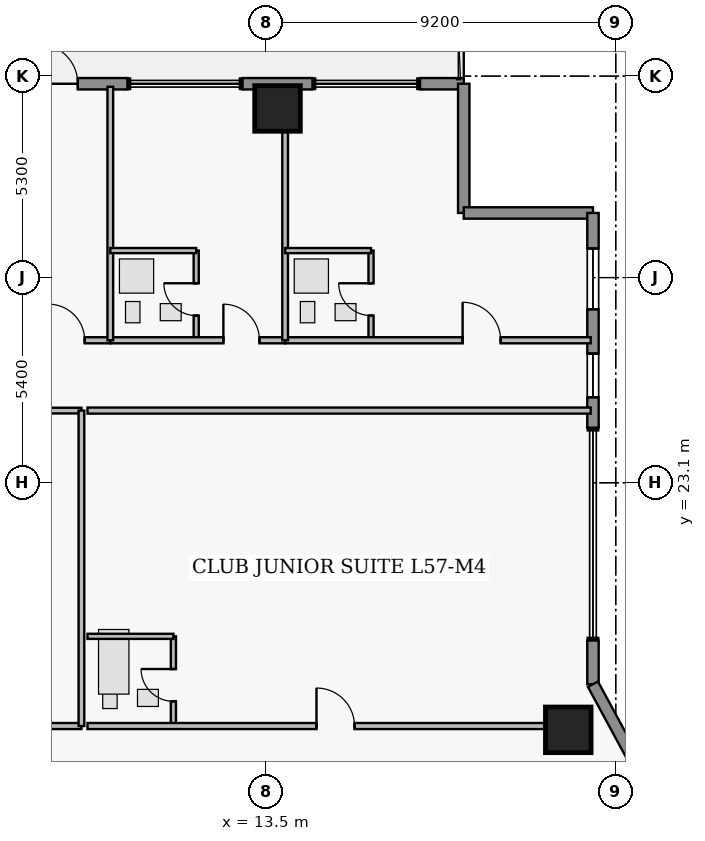
"""IFC4 building model, lengths in metres.
Left out: names, types, materials, properties, quantities, classifications, styles, units other than length and angle.
Written with IfcOpenShell. Run it as: python <this file> out.ifc"""

import sys

from ifc_helpers import new_model, si_unit, direction, frame, frame_2d, origin, origin_2d, place, context, subcontext, project, spatial, rectangle, extrude, element, fill, save


model = new_model("IFC4")
c1 = context("Model", 3, precision=1e-05, world=origin(), true_north=direction((0.0, 1.0)))
c2 = subcontext(c1, "Body", "Model", "MODEL_VIEW")
j1 = project(units=[si_unit("LENGTHUNIT", "METRE"), si_unit("PLANEANGLEUNIT", "RADIAN")], contexts=[c1])
p1 = place(None, origin())
s1 = spatial("IfcSite", under=j1, at=p1, CompositionType="ELEMENT")
p2 = place(p1, origin())
s2 = spatial("IfcBuilding", under=s1, at=p2, CompositionType="ELEMENT")
p3 = place(p2, frame((0.0, 0.0, 226.15)))
s3 = spatial("IfcBuildingStorey", under=s2, at=p3, CompositionType="ELEMENT", Elevation=226.15)
for number, where, z_axis, x_axis in (
    (1, (13.8, 32.95, 0.0), (0.0, 0.0, 1.0), (1.0, 0.0, 0.0)),
    (2, (21.45, 16.6, 0.0), (0.0, 0.0, 1.0), (1.0, 0.0, 0.0)),
):
    element("IfcColumn", number, at=place(p3, frame(where, z_axis=z_axis, x_axis=x_axis)), inside=s3, PredefinedType="COLUMN", context=c2, shape_type="SweptSolid", body=[
        extrude(rectangle(XDim=1.2, YDim=1.2, at=origin_2d()), origin(), (0.0, 0.0, 1.0), 3.75),
    ])
p4 = place(p3, frame((3.68, 33.6, 0.0), z_axis=(0.0, 0.0, 1.0), x_axis=(1.0, 0.0, 0.0)))
e3 = element("IfcWall", 3, at=p4, inside=s3, PredefinedType="STANDARD", context=c2, shape_type="SweptSolid", body=[
    extrude(rectangle(XDim=6.17, YDim=0.3, at=frame_2d((3.085, 0.0))), origin(), (0.0, 0.0, 1.0), 3.53),
])
p5 = place(p4, frame((3.815, 0.0, 0.0)))
e4 = element("IfcOpeningElement", 4, at=p5, cuts=e3, PredefinedType="OPENING", context=c2, shape_type="SweptSolid", body=[
    extrude(rectangle(XDim=1.05, YDim=2.2, at=frame_2d((0.525, 1.1))), frame((0.0, 0.16, 0.0), z_axis=(0.0, -1.0, 0.0), x_axis=(1.0, 0.0, 0.0)), (0.0, 0.0, 1.0), 0.32),
])
p6 = place(p4, frame((2.018, 0.0, 0.95)))
e5 = element("IfcOpeningElement", 5, at=p6, cuts=e3, PredefinedType="OPENING", context=c2, shape_type="SweptSolid", body=[
    extrude(rectangle(XDim=1.15, YDim=1.55, at=frame_2d((0.575, 0.775))), frame((0.0, 0.16, 0.0), z_axis=(0.0, -1.0, 0.0), x_axis=(1.0, 0.0, 0.0)), (0.0, 0.0, 1.0), 0.32),
])
p7 = place(p3, frame((12.88, 33.6, 0.0), z_axis=(0.0, 0.0, 1.0), x_axis=(1.0, 0.0, 0.0)))
e6 = element("IfcWall", 6, at=p7, inside=s3, PredefinedType="STANDARD", context=c2, shape_type="SweptSolid", body=[
    extrude(rectangle(XDim=1.84, YDim=0.3, at=frame_2d((0.92, 0.0))), origin(), (0.0, 0.0, 1.0), 3.53),
])
p8 = place(p3, frame((17.55, 33.6, 0.0), z_axis=(0.0, 0.0, 1.0), x_axis=(1.0, 0.0, 0.0)))
e7 = element("IfcWall", 7, at=p8, inside=s3, PredefinedType="STANDARD", context=c2, shape_type="SweptSolid", body=[
    extrude(rectangle(XDim=1.15, YDim=0.3, at=frame_2d((0.575, 0.0))), origin(), (0.0, 0.0, 1.0), 3.53),
])
for number, where, z_axis, x_axis in (
    (8, (18.7, 33.6, 0.0), (0.0, 0.0, 1.0), (0.0, -1.0, 0.0)),
    (9, (18.7, 30.2, 0.0), (0.0, 0.0, 1.0), (1.0, 0.0, 0.0)),
):
    element("IfcWall", number, at=place(p3, frame(where, z_axis=z_axis, x_axis=x_axis)), inside=s3, PredefinedType="STANDARD", context=c2, shape_type="SweptSolid", body=[
        extrude(rectangle(XDim=3.4, YDim=0.3, at=frame_2d((1.7, 0.0))), origin(), (0.0, 0.0, 1.0), 3.53),
    ])
p9 = place(p3, frame((22.1, 30.2, 0.0), z_axis=(0.0, 0.0, 1.0), x_axis=(0.0, -1.0, 0.0)))
e10 = element("IfcWall", 10, at=p9, inside=s3, PredefinedType="STANDARD", context=c2, shape_type="SweptSolid", body=[
    extrude(rectangle(XDim=5.65, YDim=0.3, at=frame_2d((2.825, 0.0))), origin(), (0.0, 0.0, 1.0), 3.53),
])
p10 = place(p9, frame((0.935, 0.0, 0.85)))
e11 = element("IfcOpeningElement", 11, at=p10, cuts=e10, PredefinedType="OPENING", context=c2, shape_type="SweptSolid", body=[
    extrude(rectangle(XDim=1.6, YDim=1.8, at=frame_2d((0.8, 0.9))), frame((0.0, 0.16, 0.0), z_axis=(0.0, -1.0, 0.0), x_axis=(1.0, 0.0, 0.0)), (0.0, 0.0, 1.0), 0.32),
])
p11 = place(p9, frame((3.7, 0.0, 0.95)))
e12 = element("IfcOpeningElement", 12, at=p11, cuts=e10, PredefinedType="OPENING", context=c2, shape_type="SweptSolid", body=[
    extrude(rectangle(XDim=1.15, YDim=1.55, at=frame_2d((0.575, 0.775))), frame((0.0, 0.16, 0.0), z_axis=(0.0, -1.0, 0.0), x_axis=(1.0, 0.0, 0.0)), (0.0, 0.0, 1.0), 0.32),
])
p12 = place(p3, frame((22.1, 18.95, 0.0), z_axis=(0.0, 0.0, 1.0), x_axis=(0.0, -1.0, 0.0)))
e13 = element("IfcWall", 13, at=p12, inside=s3, PredefinedType="STANDARD", context=c2, shape_type="SweptSolid", body=[
    extrude(rectangle(XDim=1.15, YDim=0.3, at=frame_2d((0.575, 0.0))), origin(), (0.0, 0.0, 1.0), 3.53),
])
p13 = place(p3, frame((22.1, 17.8, 0.0), z_axis=(0.0, 0.0, 1.0), x_axis=(0.476258655584, -0.879305233114, 0.0)))
e14 = element("IfcWall", 14, at=p13, inside=s3, PredefinedType="STANDARD", context=c2, shape_type="SweptSolid", body=[
    extrude(rectangle(XDim=5.459, YDim=0.3, at=frame_2d((2.729, 0.0))), origin(), (0.0, 0.0, 1.0), 3.53),
])
p14 = place(p3, frame((4.8, 26.85, 0.0), z_axis=(0.0, 0.0, 1.0), x_axis=(1.0, 0.0, 0.0)))
e15 = element("IfcWall", 15, at=p14, inside=s3, PredefinedType="PARTITIONING", context=c2, shape_type="SweptSolid", body=[
    extrude(rectangle(XDim=4.6, YDim=0.16, at=frame_2d((2.3, 0.0))), origin(), (0.0, 0.0, 1.0), 3.53),
])
p15 = place(p14, frame((2.975, 0.0, 0.0)))
e16 = element("IfcOpeningElement", 16, at=p15, cuts=e15, PredefinedType="OPENING", context=c2, shape_type="SweptSolid", body=[
    extrude(rectangle(XDim=0.95, YDim=2.15, at=frame_2d((0.475, 1.075))), frame((0.0, 0.09, 0.0), z_axis=(0.0, -1.0, 0.0), x_axis=(1.0, 0.0, 0.0)), (0.0, 0.0, 1.0), 0.18),
])
p16 = place(p3, frame((11.66, 26.85, 0.0), z_axis=(0.0, 0.0, 1.0), x_axis=(0.0, 1.0, 0.0)))
e17 = element("IfcWall", 17, at=p16, inside=s3, PredefinedType="PLUMBINGWALL", context=c2, shape_type="SweptSolid", body=[
    extrude(rectangle(XDim=2.36, YDim=0.135, at=frame_2d((1.18, 0.0))), origin(), (0.0, 0.0, 1.0), 3.53),
])
p17 = place(p16, frame((0.65, 0.0, 0.0)))
e18 = element("IfcOpeningElement", 18, at=p17, cuts=e17, PredefinedType="OPENING", context=c2, shape_type="SweptSolid", body=[
    extrude(rectangle(XDim=0.85, YDim=2.1, at=frame_2d((0.425, 1.05))), frame((0.0, 0.077, 0.0), z_axis=(0.0, -1.0, 0.0), x_axis=(1.0, 0.0, 0.0)), (0.0, 0.0, 1.0), 0.155),
])
p18 = place(p3, frame((9.4, 26.85, 0.0), z_axis=(0.0, 0.0, 1.0), x_axis=(1.0, 0.0, 0.0)))
e19 = element("IfcWall", 19, at=p18, inside=s3, PredefinedType="PARTITIONING", context=c2, shape_type="SweptSolid", body=[
    extrude(rectangle(XDim=4.6, YDim=0.16, at=frame_2d((2.3, 0.0))), origin(), (0.0, 0.0, 1.0), 3.53),
])
p19 = place(p18, frame((2.975, 0.0, 0.0)))
e20 = element("IfcOpeningElement", 20, at=p19, cuts=e19, PredefinedType="OPENING", context=c2, shape_type="SweptSolid", body=[
    extrude(rectangle(XDim=0.95, YDim=2.15, at=frame_2d((0.475, 1.075))), frame((0.0, 0.09, 0.0), z_axis=(0.0, -1.0, 0.0), x_axis=(1.0, 0.0, 0.0)), (0.0, 0.0, 1.0), 0.18),
])
p20 = place(p3, frame((16.26, 26.85, 0.0), z_axis=(0.0, 0.0, 1.0), x_axis=(0.0, 1.0, 0.0)))
e21 = element("IfcWall", 21, at=p20, inside=s3, PredefinedType="PLUMBINGWALL", context=c2, shape_type="SweptSolid", body=[
    extrude(rectangle(XDim=2.36, YDim=0.135, at=frame_2d((1.18, 0.0))), origin(), (0.0, 0.0, 1.0), 3.53),
])
p21 = place(p20, frame((0.65, 0.0, 0.0)))
e22 = element("IfcOpeningElement", 22, at=p21, cuts=e21, PredefinedType="OPENING", context=c2, shape_type="SweptSolid", body=[
    extrude(rectangle(XDim=0.85, YDim=2.1, at=frame_2d((0.425, 1.05))), frame((0.0, 0.077, 0.0), z_axis=(0.0, -1.0, 0.0), x_axis=(1.0, 0.0, 0.0)), (0.0, 0.0, 1.0), 0.155),
])
p22 = place(p3, frame((14.0, 26.85, 0.0), z_axis=(0.0, 0.0, 1.0), x_axis=(1.0, 0.0, 0.0)))
e23 = element("IfcWall", 23, at=p22, inside=s3, PredefinedType="PARTITIONING", context=c2, shape_type="SweptSolid", body=[
    extrude(rectangle(XDim=8.04, YDim=0.16, at=frame_2d((4.02, 0.0))), origin(), (0.0, 0.0, 1.0), 3.53),
])
p23 = place(p22, frame((4.67, 0.0, 0.0)))
e24 = element("IfcOpeningElement", 24, at=p23, cuts=e23, PredefinedType="OPENING", context=c2, shape_type="SweptSolid", body=[
    extrude(rectangle(XDim=1.0, YDim=2.15, at=frame_2d((0.5, 1.075))), frame((0.0, 0.09, 0.0), z_axis=(0.0, -1.0, 0.0), x_axis=(1.0, 0.0, 0.0)), (0.0, 0.0, 1.0), 0.18),
])
p24 = place(p3, frame((0.98, 16.7, 0.0), z_axis=(0.0, 0.0, 1.0), x_axis=(1.0, 0.0, 0.0)))
e25 = element("IfcWall", 25, at=p24, inside=s3, PredefinedType="PARTITIONING", context=c2, shape_type="SweptSolid", body=[
    extrude(rectangle(XDim=7.66, YDim=0.16, at=frame_2d((3.83, 0.0))), origin(), (0.0, 0.0, 1.0), 3.124),
])
p25 = place(p24, frame((5.43, 0.0, 0.0)))
e26 = element("IfcOpeningElement", 26, at=p25, cuts=e25, PredefinedType="OPENING", context=c2, shape_type="SweptSolid", body=[
    extrude(rectangle(XDim=1.08, YDim=2.18, at=frame_2d((0.54, 1.09))), frame((0.0, 0.09, 0.0), z_axis=(0.0, -1.0, 0.0), x_axis=(1.0, 0.0, 0.0)), (0.0, 0.0, 1.0), 0.18),
])
p26 = place(p3, frame((11.06, 16.7, 0.0), z_axis=(0.0, 0.0, 1.0), x_axis=(0.0, 1.0, 0.0)))
e27 = element("IfcWall", 27, at=p26, inside=s3, PredefinedType="PLUMBINGWALL", context=c2, shape_type="SweptSolid", body=[
    extrude(rectangle(XDim=2.36, YDim=0.135, at=frame_2d((1.18, 0.0))), origin(), (0.0, 0.0, 1.0), 3.53),
])
p27 = place(p26, frame((0.65, 0.0, 0.0)))
e28 = element("IfcOpeningElement", 28, at=p27, cuts=e27, PredefinedType="OPENING", context=c2, shape_type="SweptSolid", body=[
    extrude(rectangle(XDim=0.85, YDim=2.1, at=frame_2d((0.425, 1.05))), frame((0.0, 0.077, 0.0), z_axis=(0.0, -1.0, 0.0), x_axis=(1.0, 0.0, 0.0)), (0.0, 0.0, 1.0), 0.155),
])
p28 = place(p3, frame((8.8, 16.7, 0.0), z_axis=(0.0, 0.0, 1.0), x_axis=(1.0, 0.0, 0.0)))
e29 = element("IfcWall", 29, at=p28, inside=s3, PredefinedType="PARTITIONING", context=c2, shape_type="SweptSolid", body=[
    extrude(rectangle(XDim=13.24, YDim=0.16, at=frame_2d((6.62, 0.0))), origin(), (0.0, 0.0, 1.0), 3.124),
])
p29 = place(p28, frame((6.025, 0.0, 0.0)))
e30 = element("IfcOpeningElement", 30, at=p29, cuts=e29, PredefinedType="OPENING", context=c2, shape_type="SweptSolid", body=[
    extrude(rectangle(XDim=1.0, YDim=2.15, at=frame_2d((0.5, 1.075))), frame((0.0, 0.09, 0.0), z_axis=(0.0, -1.0, 0.0), x_axis=(1.0, 0.0, 0.0)), (0.0, 0.0, 1.0), 0.18),
])
p30 = place(p3, frame((9.4, 26.85, 0.0), z_axis=(0.0, 0.0, 1.0), x_axis=(0.0, 1.0, 0.0)))
e31 = element("IfcWall", 31, at=p30, inside=s3, PredefinedType="PARTITIONING", context=c2, shape_type="SweptSolid", body=[
    extrude(rectangle(XDim=6.67, YDim=0.15, at=frame_2d((3.335, 0.0))), origin(), (0.0, 0.0, 1.0), 3.53),
])
p31 = place(p3, frame((9.4, 29.21, 0.0), z_axis=(0.0, 0.0, 1.0), x_axis=(1.0, 0.0, 0.0)))
e32 = element("IfcWall", 32, at=p31, inside=s3, PredefinedType="PLUMBINGWALL", context=c2, shape_type="SweptSolid", body=[
    extrude(rectangle(XDim=2.26, YDim=0.135, at=frame_2d((1.13, 0.0))), origin(), (0.0, 0.0, 1.0), 3.53),
])
p32 = place(p3, frame((14.0, 26.85, 0.0), z_axis=(0.0, 0.0, 1.0), x_axis=(0.0, 1.0, 0.0)))
e33 = element("IfcWall", 33, at=p32, inside=s3, PredefinedType="PARTITIONING", context=c2, shape_type="SweptSolid", body=[
    extrude(rectangle(XDim=6.67, YDim=0.15, at=frame_2d((3.335, 0.0))), origin(), (0.0, 0.0, 1.0), 2.519),
])
p33 = place(p3, frame((14.0, 29.21, 0.0), z_axis=(0.0, 0.0, 1.0), x_axis=(1.0, 0.0, 0.0)))
e34 = element("IfcWall", 34, at=p33, inside=s3, PredefinedType="PLUMBINGWALL", context=c2, shape_type="SweptSolid", body=[
    extrude(rectangle(XDim=2.26, YDim=0.135, at=frame_2d((1.13, 0.0))), origin(), (0.0, 0.0, 1.0), 3.53),
])
p34 = place(p3, frame((0.98, 25.0, 0.0), z_axis=(0.0, 0.0, 1.0), x_axis=(1.0, 0.0, 0.0)))
e35 = element("IfcWall", 35, at=p34, inside=s3, PredefinedType="PARTITIONING", context=c2, shape_type="SweptSolid", body=[
    extrude(rectangle(XDim=7.66, YDim=0.15, at=frame_2d((3.83, 0.0))), origin(), (0.0, 0.0, 1.0), 3.124),
])
p35 = place(p3, frame((8.64, 16.7, 0.0), z_axis=(0.0, 0.0, 1.0), x_axis=(0.0, 1.0, 0.0)))
e36 = element("IfcWall", 36, at=p35, inside=s3, PredefinedType="PARTITIONING", context=c2, shape_type="SweptSolid", body=[
    extrude(rectangle(XDim=8.3, YDim=0.15, at=frame_2d((4.15, 0.0))), origin(), (0.0, 0.0, 1.0), 3.53),
])
p36 = place(p3, frame((8.8, 19.06, 0.0), z_axis=(0.0, 0.0, 1.0), x_axis=(1.0, 0.0, 0.0)))
e37 = element("IfcWall", 37, at=p36, inside=s3, PredefinedType="PLUMBINGWALL", context=c2, shape_type="SweptSolid", body=[
    extrude(rectangle(XDim=2.26, YDim=0.135, at=frame_2d((1.13, 0.0))), origin(), (0.0, 0.0, 1.0), 3.124),
])
p37 = place(p3, frame((8.8, 25.0, 0.0), z_axis=(0.0, 0.0, 1.0), x_axis=(1.0, 0.0, 0.0)))
e38 = element("IfcWall", 38, at=p37, inside=s3, PredefinedType="PARTITIONING", context=c2, shape_type="SweptSolid", body=[
    extrude(rectangle(XDim=13.24, YDim=0.16, at=frame_2d((6.62, 0.0))), origin(), (0.0, 0.0, 1.0), 3.124),
])
p38 = place(p5, origin())
e39 = element("IfcDoor", 39, at=p38, inside=s3, OperationType="SINGLE_SWING_LEFT", PredefinedType="DOOR", context=c2, shape_type="SweptSolid", body=[
    extrude(rectangle(XDim=1.05, YDim=2.2, at=frame_2d((0.525, 1.1))), frame((0.0, 0.025, 0.0), z_axis=(0.0, -1.0, 0.0), x_axis=(1.0, 0.0, 0.0)), (0.0, 0.0, 1.0), 0.05),
])
fill(e4, e39)
p39 = place(p10, origin())
e40 = element("IfcWindow", 40, at=p39, inside=s3, PartitioningType="SINGLE_PANEL", PredefinedType="WINDOW", context=c2, shape_type="SweptSolid", body=[
    extrude(rectangle(XDim=1.6, YDim=1.8, at=frame_2d((0.8, 0.9))), frame((0.0, 0.03, 0.0), z_axis=(0.0, -1.0, 0.0), x_axis=(1.0, 0.0, 0.0)), (0.0, 0.0, 1.0), 0.06),
])
fill(e11, e40)
p40 = place(p11, origin())
e41 = element("IfcWindow", 41, at=p40, inside=s3, PartitioningType="SINGLE_PANEL", PredefinedType="WINDOW", context=c2, shape_type="SweptSolid", body=[
    extrude(rectangle(XDim=1.15, YDim=1.55, at=frame_2d((0.575, 0.775))), frame((0.0, 0.03, 0.0), z_axis=(0.0, -1.0, 0.0), x_axis=(1.0, 0.0, 0.0)), (0.0, 0.0, 1.0), 0.06),
])
fill(e12, e41)
p41 = place(p15, origin())
e42 = element("IfcDoor", 42, at=p41, inside=s3, OperationType="SINGLE_SWING_LEFT", PredefinedType="DOOR", context=c2, shape_type="SweptSolid", body=[
    extrude(rectangle(XDim=0.95, YDim=2.15, at=frame_2d((0.475, 1.075))), frame((0.0, 0.025, 0.0), z_axis=(0.0, -1.0, 0.0), x_axis=(1.0, 0.0, 0.0)), (0.0, 0.0, 1.0), 0.05),
])
fill(e16, e42)
p42 = place(p17, origin())
e43 = element("IfcDoor", 43, at=p42, inside=s3, OperationType="SINGLE_SWING_RIGHT", PredefinedType="DOOR", context=c2, shape_type="SweptSolid", body=[
    extrude(rectangle(XDim=0.85, YDim=2.1, at=frame_2d((0.425, 1.05))), frame((0.0, 0.025, 0.0), z_axis=(0.0, -1.0, 0.0), x_axis=(1.0, 0.0, 0.0)), (0.0, 0.0, 1.0), 0.05),
])
fill(e18, e43)
p43 = place(p19, origin())
e44 = element("IfcDoor", 44, at=p43, inside=s3, OperationType="SINGLE_SWING_LEFT", PredefinedType="DOOR", context=c2, shape_type="SweptSolid", body=[
    extrude(rectangle(XDim=0.95, YDim=2.15, at=frame_2d((0.475, 1.075))), frame((0.0, 0.025, 0.0), z_axis=(0.0, -1.0, 0.0), x_axis=(1.0, 0.0, 0.0)), (0.0, 0.0, 1.0), 0.05),
])
fill(e20, e44)
p44 = place(p21, origin())
e45 = element("IfcDoor", 45, at=p44, inside=s3, OperationType="SINGLE_SWING_RIGHT", PredefinedType="DOOR", context=c2, shape_type="SweptSolid", body=[
    extrude(rectangle(XDim=0.85, YDim=2.1, at=frame_2d((0.425, 1.05))), frame((0.0, 0.025, 0.0), z_axis=(0.0, -1.0, 0.0), x_axis=(1.0, 0.0, 0.0)), (0.0, 0.0, 1.0), 0.05),
])
fill(e22, e45)
p45 = place(p23, origin())
e46 = element("IfcDoor", 46, at=p45, inside=s3, OperationType="SINGLE_SWING_LEFT", PredefinedType="DOOR", context=c2, shape_type="SweptSolid", body=[
    extrude(rectangle(XDim=1.0, YDim=2.15, at=frame_2d((0.5, 1.075))), frame((0.0, 0.025, 0.0), z_axis=(0.0, -1.0, 0.0), x_axis=(1.0, 0.0, 0.0)), (0.0, 0.0, 1.0), 0.05),
])
fill(e24, e46)
p46 = place(p27, origin())
e47 = element("IfcDoor", 47, at=p46, inside=s3, OperationType="SINGLE_SWING_RIGHT", PredefinedType="DOOR", context=c2, shape_type="SweptSolid", body=[
    extrude(rectangle(XDim=0.85, YDim=2.1, at=frame_2d((0.425, 1.05))), frame((0.0, 0.025, 0.0), z_axis=(0.0, -1.0, 0.0), x_axis=(1.0, 0.0, 0.0)), (0.0, 0.0, 1.0), 0.05),
])
fill(e28, e47)
p47 = place(p29, origin())
e48 = element("IfcDoor", 48, at=p47, inside=s3, OperationType="SINGLE_SWING_LEFT", PredefinedType="DOOR", context=c2, shape_type="SweptSolid", body=[
    extrude(rectangle(XDim=1.0, YDim=2.15, at=frame_2d((0.5, 1.075))), frame((0.0, 0.025, 0.0), z_axis=(0.0, -1.0, 0.0), x_axis=(1.0, 0.0, 0.0)), (0.0, 0.0, 1.0), 0.05),
])
fill(e30, e48)
save(model, sys.argv[1])
